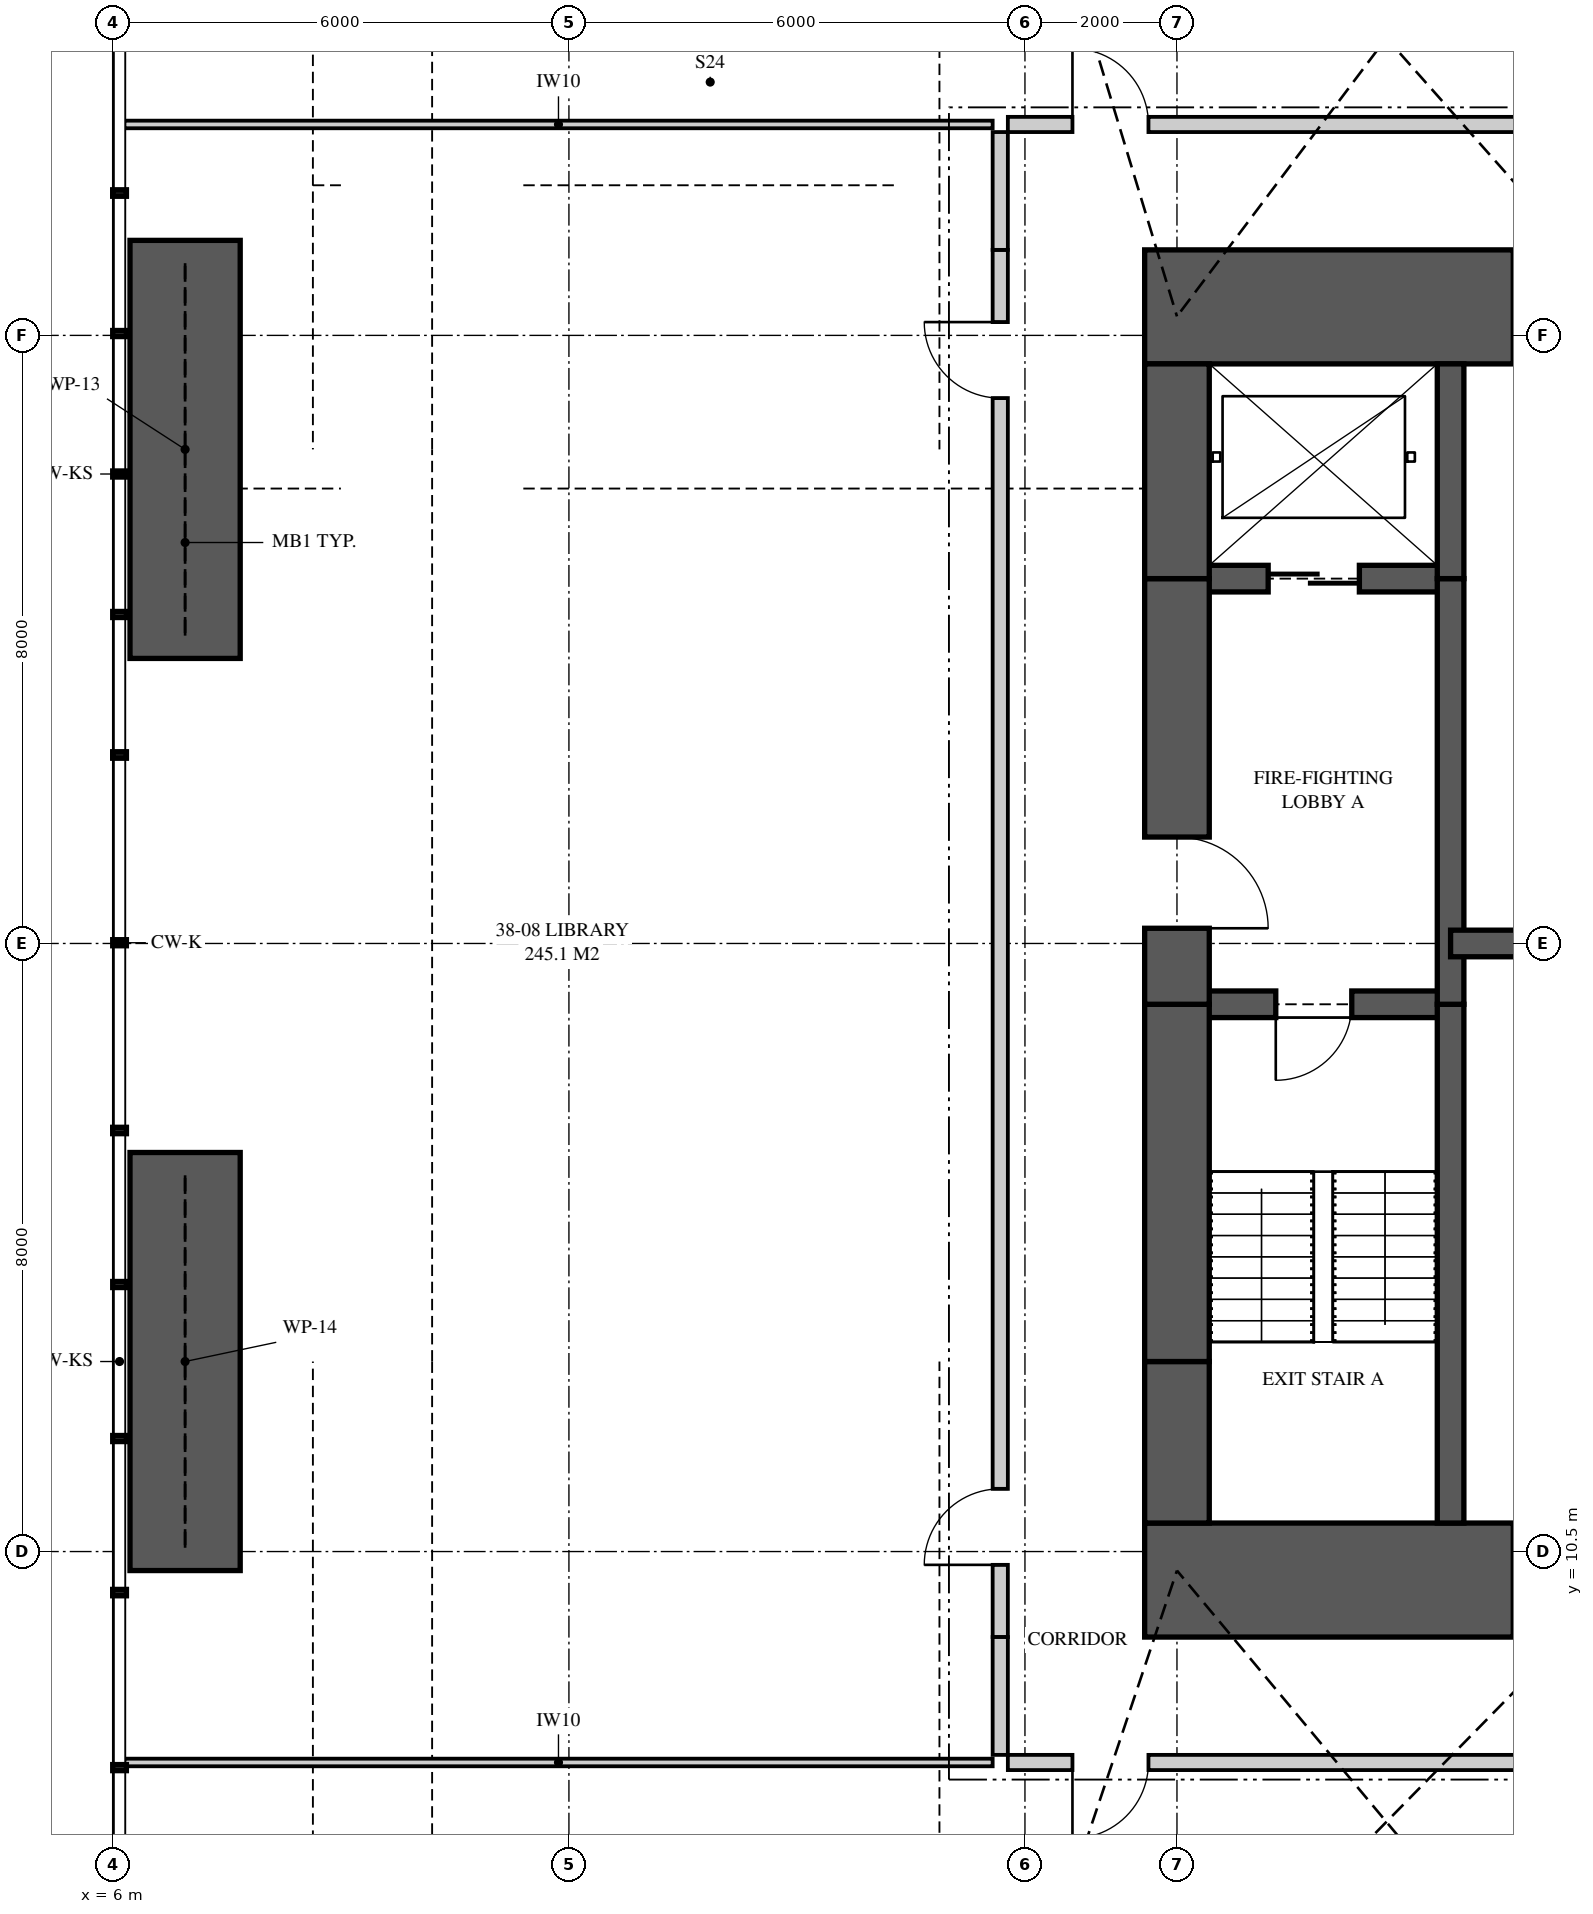
"""IFC4 building model, lengths in metres.
Left out: names, types, materials, properties, quantities, classifications, styles, units other than length and angle.
Written with IfcOpenShell. Run it as: python <this file> out.ifc"""

import sys

from ifc_helpers import new_model, si_unit, direction, frame, frame_2d, origin, place, context, subcontext, project, spatial, polyline, rectangle, outline, extrude, element, fill, save


model = new_model("IFC4")
c1 = context("Model", 3, precision=1e-05, world=origin(), true_north=direction((0.0, 1.0)))
c2 = subcontext(c1, "Body", "Model", "MODEL_VIEW")
j1 = project(units=[si_unit("LENGTHUNIT", "METRE"), si_unit("PLANEANGLEUNIT", "RADIAN")], contexts=[c1])
p1 = place(None, origin())
s1 = spatial("IfcSite", under=j1, at=p1, CompositionType="ELEMENT")
p2 = place(p1, origin())
s2 = spatial("IfcBuilding", under=s1, at=p2, CompositionType="ELEMENT")
p3 = place(p2, frame((0.0, 0.0, 138.35)))
s3 = spatial("IfcBuildingStorey", under=s2, at=p3, CompositionType="ELEMENT", Elevation=138.35)
p4 = place(p3, frame((19.575, 10.125, 0.0), z_axis=(0.0, 0.0, 1.0), x_axis=(1.0, 0.0, 0.0)))
e1 = element("IfcWall", 1, at=p4, inside=s3, PredefinedType="SHEAR", context=c2, shape_type="SweptSolid", body=[
    extrude(rectangle(XDim=6.425, YDim=1.5, at=frame_2d((3.212, 0.0))), origin(), (0.0, 0.0, 1.0), 6.0),
])
p5 = place(p4, frame((4.85, 0.0, 0.0)))
e2 = element("IfcOpeningElement", 2, at=p5, cuts=e1, PredefinedType="OPENING", context=c2, shape_type="SweptSolid", body=[
    extrude(rectangle(XDim=0.75, YDim=2.1, at=frame_2d((0.375, 1.05))), frame((0.0, 0.76, 0.0), z_axis=(0.0, -1.0, 0.0), x_axis=(1.0, 0.0, 0.0)), (0.0, 0.0, 1.0), 1.52),
])
p6 = place(p3, frame((26.0, 26.875, 0.0), z_axis=(0.0, 0.0, 1.0), x_axis=(-1.0, 0.0, 0.0)))
e3 = element("IfcWall", 3, at=p6, inside=s3, PredefinedType="SHEAR", context=c2, shape_type="SweptSolid", body=[
    extrude(rectangle(XDim=6.425, YDim=1.5, at=frame_2d((3.212, 0.0))), origin(), (0.0, 0.0, 1.0), 6.0),
])
p7 = place(p6, frame((0.825, 0.0, 0.0)))
e4 = element("IfcOpeningElement", 4, at=p7, cuts=e3, PredefinedType="OPENING", context=c2, shape_type="SweptSolid", body=[
    extrude(rectangle(XDim=0.75, YDim=2.1, at=frame_2d((0.375, 1.05))), frame((0.0, 0.76, 0.0), z_axis=(0.0, -1.0, 0.0), x_axis=(1.0, 0.0, 0.0)), (0.0, 0.0, 1.0), 1.52),
])
p8 = place(p3, frame((20.0, 26.125, 0.0), z_axis=(0.0, 0.0, 1.0), x_axis=(0.0, -1.0, 0.0)))
e5 = element("IfcWall", 5, at=p8, inside=s3, PredefinedType="SHEAR", context=c2, shape_type="SweptSolid", body=[
    extrude(rectangle(XDim=2.825, YDim=0.85, at=frame_2d((1.413, 0.0))), origin(), (0.0, 0.0, 1.0), 6.0),
])
p9 = place(p3, frame((20.0, 23.3, 0.0), z_axis=(0.0, 0.0, 1.0), x_axis=(0.0, -1.0, 0.0)))
e6 = element("IfcWall", 6, at=p9, inside=s3, PredefinedType="SHEAR", context=c2, shape_type="SweptSolid", body=[
    extrude(rectangle(XDim=5.6, YDim=0.85, at=frame_2d((2.8, 0.0))), origin(), (0.0, 0.0, 1.0), 6.0),
])
p10 = place(p9, frame((3.4, 0.0, 0.0)))
e7 = element("IfcOpeningElement", 7, at=p10, cuts=e6, PredefinedType="OPENING", context=c2, shape_type="SweptSolid", body=[
    extrude(rectangle(XDim=1.2, YDim=2.2, at=frame_2d((0.6, 1.1))), frame((0.0, 0.435, 0.0), z_axis=(0.0, -1.0, 0.0), x_axis=(1.0, 0.0, 0.0)), (0.0, 0.0, 1.0), 0.87),
])
p11 = place(p3, frame((20.0, 17.7, 0.0), z_axis=(0.0, 0.0, 1.0), x_axis=(0.0, -1.0, 0.0)))
e8 = element("IfcWall", 8, at=p11, inside=s3, PredefinedType="SHEAR", context=c2, shape_type="SweptSolid", body=[
    extrude(rectangle(XDim=4.7, YDim=0.85, at=frame_2d((2.35, 0.0))), origin(), (0.0, 0.0, 1.0), 6.0),
])
p12 = place(p3, frame((20.0, 13.0, 0.0), z_axis=(0.0, 0.0, 1.0), x_axis=(0.0, -1.0, 0.0)))
e9 = element("IfcWall", 9, at=p12, inside=s3, PredefinedType="SHEAR", context=c2, shape_type="SweptSolid", body=[
    extrude(rectangle(XDim=2.125, YDim=0.85, at=frame_2d((1.062, 0.0))), origin(), (0.0, 0.0, 1.0), 6.0),
])
p13 = place(p3, frame((23.6, 10.875, 0.0), z_axis=(0.0, 0.0, 1.0), x_axis=(0.0, 1.0, 0.0)))
e10 = element("IfcWall", 10, at=p13, inside=s3, PredefinedType="SHEAR", context=c2, shape_type="SweptSolid", body=[
    extrude(rectangle(XDim=6.825, YDim=0.35, at=frame_2d((3.413, 0.0))), origin(), (0.0, 0.0, 1.0), 6.0),
])
p14 = place(p3, frame((23.6, 17.7, 0.0), z_axis=(0.0, 0.0, 1.0), x_axis=(0.0, 1.0, 0.0)))
e11 = element("IfcWall", 11, at=p14, inside=s3, PredefinedType="SHEAR", context=c2, shape_type="SweptSolid", body=[
    extrude(rectangle(XDim=5.6, YDim=0.35, at=frame_2d((2.8, 0.0))), origin(), (0.0, 0.0, 1.0), 6.0),
])
p15 = place(p3, frame((23.6, 23.3, 0.0), z_axis=(0.0, 0.0, 1.0), x_axis=(0.0, 1.0, 0.0)))
e12 = element("IfcWall", 12, at=p15, inside=s3, PredefinedType="SHEAR", context=c2, shape_type="SweptSolid", body=[
    extrude(rectangle(XDim=2.825, YDim=0.35, at=frame_2d((1.413, 0.0))), origin(), (0.0, 0.0, 1.0), 6.0),
])
p16 = place(p3, frame((20.0, 17.7, 0.0), z_axis=(0.0, 0.0, 1.0), x_axis=(1.0, 0.0, 0.0)))
e13 = element("IfcWall", 13, at=p16, inside=s3, PredefinedType="SHEAR", context=c2, shape_type="SweptSolid", body=[
    extrude(rectangle(XDim=3.6, YDim=0.35, at=frame_2d((1.8, 0.0))), origin(), (0.0, 0.0, 1.0), 6.0),
])
p17 = place(p16, frame((1.3, 0.0, 0.0)))
e14 = element("IfcOpeningElement", 14, at=p17, cuts=e13, PredefinedType="OPENING", context=c2, shape_type="SweptSolid", body=[
    extrude(rectangle(XDim=1.0, YDim=2.1, at=frame_2d((0.5, 1.05))), frame((0.0, 0.185, 0.0), z_axis=(0.0, -1.0, 0.0), x_axis=(1.0, 0.0, 0.0)), (0.0, 0.0, 1.0), 0.37),
])
p18 = place(p3, frame((20.0, 23.3, 0.0), z_axis=(0.0, 0.0, 1.0), x_axis=(1.0, 0.0, 0.0)))
e15 = element("IfcWall", 15, at=p18, inside=s3, PredefinedType="SHEAR", context=c2, shape_type="SweptSolid", body=[
    extrude(rectangle(XDim=3.6, YDim=0.35, at=frame_2d((1.8, 0.0))), origin(), (0.0, 0.0, 1.0), 6.0),
])
p19 = place(p18, frame((1.2, 0.0, 0.0)))
e16 = element("IfcOpeningElement", 16, at=p19, cuts=e15, PredefinedType="OPENING", context=c2, shape_type="SweptSolid", body=[
    extrude(rectangle(XDim=1.2, YDim=2.1, at=frame_2d((0.6, 1.05))), frame((0.0, 0.185, 0.0), z_axis=(0.0, -1.0, 0.0), x_axis=(1.0, 0.0, 0.0)), (0.0, 0.0, 1.0), 0.37),
])
p20 = place(p3, frame((23.6, 18.5, 0.0), z_axis=(0.0, 0.0, 1.0), x_axis=(1.0, 0.0, 0.0)))
e17 = element("IfcWall", 17, at=p20, inside=s3, PredefinedType="SHEAR", context=c2, shape_type="SweptSolid", body=[
    extrude(rectangle(XDim=2.4, YDim=0.35, at=frame_2d((1.2, 0.0))), origin(), (0.0, 0.0, 1.0), 6.0),
])
p21 = place(p3, frame((17.775, 7.725, 0.0), z_axis=(0.0, 0.0, 1.0), x_axis=(1.0, 0.0, 0.0)))
e18 = element("IfcWall", 18, at=p21, inside=s3, PredefinedType="PARTITIONING", context=c2, shape_type="SweptSolid", body=[
    extrude(outline(polyline([(0.0, 0.0), (14.275, 0.0), (14.275, 5.72), (14.002, 5.72), (14.002, 5.141), (13.092, 5.141), (13.092, 5.72), (10.26, 5.72), (10.26, 5.208), (9.69, 5.208), (9.69, 5.72), (6.177, 5.72), (6.177, 5.141), (5.319, 5.141), (5.319, 5.72), (4.72, 5.72), (4.72, 5.141), (3.938, 5.141), (3.938, 5.72), (1.659, 5.72), (1.659, 5.141), (1.094, 5.141), (1.094, 5.72), (0.0, 5.72), (0.0, 0.0)])), frame((0.0, 0.1, 0.0), z_axis=(0.0, -1.0, 0.0), x_axis=(1.0, 0.0, 0.0)), (0.0, 0.0, 1.0), 0.2),
])
p22 = place(p21, frame((0.85, 0.0, 0.0)))
e19 = element("IfcOpeningElement", 19, at=p22, cuts=e18, PredefinedType="OPENING", context=c2, shape_type="SweptSolid", body=[
    extrude(rectangle(XDim=1.0, YDim=2.1, at=frame_2d((0.5, 1.05))), frame((0.0, 0.11, 0.0), z_axis=(0.0, -1.0, 0.0), x_axis=(1.0, 0.0, 0.0)), (0.0, 0.0, 1.0), 0.22),
])
p23 = place(p21, frame((12.375, 0.0, 0.0)))
e20 = element("IfcOpeningElement", 20, at=p23, cuts=e18, PredefinedType="OPENING", context=c2, shape_type="SweptSolid", body=[
    extrude(rectangle(XDim=1.0, YDim=2.1, at=frame_2d((0.5, 1.05))), frame((0.0, 0.11, 0.0), z_axis=(0.0, -1.0, 0.0), x_axis=(1.0, 0.0, 0.0)), (0.0, 0.0, 1.0), 0.22),
])
p24 = place(p3, frame((17.675, 7.825, 0.0), z_axis=(0.0, 0.0, 1.0), x_axis=(0.0, 1.0, 0.0)))
e21 = element("IfcWall", 21, at=p24, inside=s3, PredefinedType="PARTITIONING", context=c2, shape_type="SweptSolid", body=[
    extrude(rectangle(XDim=1.55, YDim=0.2, at=frame_2d((0.775, 0.0))), origin(), (0.0, 0.0, 1.0), 5.72),
])
p25 = place(p3, frame((17.775, 29.275, 0.0), z_axis=(0.0, 0.0, 1.0), x_axis=(1.0, 0.0, 0.0)))
e22 = element("IfcWall", 22, at=p25, inside=s3, PredefinedType="PARTITIONING", context=c2, shape_type="SweptSolid", body=[
    extrude(outline(polyline([(0.0, 0.0), (14.25, 0.0), (14.25, 5.72), (13.709, 5.72), (13.709, 5.141), (12.856, 5.141), (12.856, 5.72), (10.26, 5.72), (10.26, 5.208), (9.69, 5.208), (9.69, 5.72), (6.392, 5.72), (6.392, 5.141), (5.584, 5.141), (5.584, 5.72), (4.496, 5.72), (4.496, 5.141), (3.754, 5.141), (3.754, 5.72), (1.736, 5.72), (1.736, 5.141), (1.182, 5.141), (1.182, 5.72), (0.0, 5.72), (0.0, 0.0)])), frame((0.0, 0.1, 0.0), z_axis=(0.0, -1.0, 0.0), x_axis=(1.0, 0.0, 0.0)), (0.0, 0.0, 1.0), 0.2),
])
p26 = place(p25, frame((0.85, 0.0, 0.0)))
e23 = element("IfcOpeningElement", 23, at=p26, cuts=e22, PredefinedType="OPENING", context=c2, shape_type="SweptSolid", body=[
    extrude(rectangle(XDim=1.0, YDim=2.1, at=frame_2d((0.5, 1.05))), frame((0.0, 0.11, 0.0), z_axis=(0.0, -1.0, 0.0), x_axis=(1.0, 0.0, 0.0)), (0.0, 0.0, 1.0), 0.22),
])
p27 = place(p25, frame((12.375, 0.0, 0.0)))
e24 = element("IfcOpeningElement", 24, at=p27, cuts=e22, PredefinedType="OPENING", context=c2, shape_type="SweptSolid", body=[
    extrude(rectangle(XDim=1.0, YDim=2.1, at=frame_2d((0.5, 1.05))), frame((0.0, 0.11, 0.0), z_axis=(0.0, -1.0, 0.0), x_axis=(1.0, 0.0, 0.0)), (0.0, 0.0, 1.0), 0.22),
])
p28 = place(p3, frame((17.675, 27.625, 0.0), z_axis=(0.0, 0.0, 1.0), x_axis=(0.0, 1.0, 0.0)))
e25 = element("IfcWall", 25, at=p28, inside=s3, PredefinedType="PARTITIONING", context=c2, shape_type="SweptSolid", body=[
    extrude(rectangle(XDim=1.55, YDim=0.2, at=frame_2d((0.775, 0.0))), origin(), (0.0, 0.0, 1.0), 5.72),
])
p29 = place(p3, frame((17.675, 9.375, 0.0), z_axis=(0.0, 0.0, 1.0), x_axis=(0.0, 1.0, 0.0)))
e26 = element("IfcWall", 26, at=p29, inside=s3, PredefinedType="PARTITIONING", context=c2, shape_type="SweptSolid", body=[
    extrude(outline(polyline([(0.0, 0.0), (18.25, 0.0), (18.25, 5.72), (15.975, 5.72), (15.975, 5.02), (15.275, 5.02), (15.275, 5.06), (14.833, 5.06), (14.833, 5.72), (3.975, 5.72), (3.975, 5.02), (3.275, 5.02), (3.275, 5.72), (0.0, 5.72), (0.0, 0.0)])), frame((0.0, 0.1, 0.0), z_axis=(0.0, -1.0, 0.0), x_axis=(1.0, 0.0, 0.0)), (0.0, 0.0, 1.0), 0.2),
])
p30 = place(p29, frame((0.95, 0.0, 0.0)))
e27 = element("IfcOpeningElement", 27, at=p30, cuts=e26, PredefinedType="OPENING", context=c2, shape_type="SweptSolid", body=[
    extrude(rectangle(XDim=1.0, YDim=2.1, at=frame_2d((0.5, 1.05))), frame((0.0, 0.11, 0.0), z_axis=(0.0, -1.0, 0.0), x_axis=(1.0, 0.0, 0.0)), (0.0, 0.0, 1.0), 0.22),
])
p31 = place(p29, frame((16.3, 0.0, 0.0)))
e28 = element("IfcOpeningElement", 28, at=p31, cuts=e26, PredefinedType="OPENING", context=c2, shape_type="SweptSolid", body=[
    extrude(rectangle(XDim=1.0, YDim=2.1, at=frame_2d((0.5, 1.05))), frame((0.0, 0.11, 0.0), z_axis=(0.0, -1.0, 0.0), x_axis=(1.0, 0.0, 0.0)), (0.0, 0.0, 1.0), 0.22),
])
p32 = place(p3, frame((6.15, 7.725, 0.0), z_axis=(0.0, 0.0, 1.0), x_axis=(1.0, 0.0, 0.0)))
e29 = element("IfcWall", 29, at=p32, inside=s3, PredefinedType="PARTITIONING", context=c2, shape_type="SweptSolid", body=[
    extrude(outline(polyline([(0.0, 0.0), (11.425, 0.0), (11.425, 5.72), (11.385, 5.72), (11.385, 5.12), (10.065, 5.12), (10.065, 5.72), (5.31, 5.72), (5.31, 5.12), (2.841, 5.12), (2.841, 4.52), (2.373, 4.52), (2.373, 4.32), (0.938, 4.32), (0.938, 5.72), (0.0, 5.72), (0.0, 0.0)])), frame((0.0, 0.05, 0.0), z_axis=(0.0, -1.0, 0.0), x_axis=(1.0, 0.0, 0.0)), (0.0, 0.0, 1.0), 0.1),
])
p33 = place(p3, frame((6.15, 29.275, 0.0), z_axis=(0.0, 0.0, 1.0), x_axis=(1.0, 0.0, 0.0)))
e30 = element("IfcWall", 30, at=p33, inside=s3, PredefinedType="PARTITIONING", context=c2, shape_type="SweptSolid", body=[
    extrude(outline(polyline([(0.0, 0.0), (11.425, 0.0), (11.425, 5.72), (11.385, 5.72), (11.385, 5.12), (10.065, 5.12), (10.065, 5.72), (5.31, 5.72), (5.31, 5.12), (2.841, 5.12), (2.841, 4.52), (2.21, 4.52), (2.21, 4.32), (0.776, 4.32), (0.776, 5.72), (0.0, 5.72), (0.0, 0.0)])), frame((0.0, 0.05, 0.0), z_axis=(0.0, -1.0, 0.0), x_axis=(1.0, 0.0, 0.0)), (0.0, 0.0, 1.0), 0.1),
])
for number, where, z_axis, x_axis in (
    (31, (6.95, 22.25, 0.0), (0.0, 0.0, 1.0), (0.0, 1.0, 0.0)),
    (32, (6.95, 10.25, 0.0), (0.0, 0.0, 1.0), (0.0, 1.0, 0.0)),
):
    element("IfcWall", number, at=place(p3, frame(where, z_axis=z_axis, x_axis=x_axis)), inside=s3, PredefinedType="SHEAR", context=c2, shape_type="SweptSolid", body=[
        extrude(rectangle(XDim=5.5, YDim=1.45, at=frame_2d((2.75, 0.0))), origin(), (0.0, 0.0, 1.0), 6.0),
    ])
p34 = place(p22, frame((1.0, 0.0, 0.0), z_axis=(0.0, 0.0, 1.0), x_axis=(-1.0, 0.0, 0.0)))
e33 = element("IfcDoor", 33, at=p34, inside=s3, OperationType="SINGLE_SWING_RIGHT", PredefinedType="DOOR", context=c2, shape_type="SweptSolid", body=[
    extrude(rectangle(XDim=1.0, YDim=2.1, at=frame_2d((0.5, 1.05))), frame((0.0, 0.025, 0.0), z_axis=(0.0, -1.0, 0.0), x_axis=(1.0, 0.0, 0.0)), (0.0, 0.0, 1.0), 0.05),
])
fill(e19, e33)
p35 = place(p26, origin())
e34 = element("IfcDoor", 34, at=p35, inside=s3, OperationType="SINGLE_SWING_LEFT", PredefinedType="DOOR", context=c2, shape_type="SweptSolid", body=[
    extrude(rectangle(XDim=1.0, YDim=2.1, at=frame_2d((0.5, 1.05))), frame((0.0, 0.025, 0.0), z_axis=(0.0, -1.0, 0.0), x_axis=(1.0, 0.0, 0.0)), (0.0, 0.0, 1.0), 0.05),
])
fill(e23, e34)
p36 = place(p30, origin())
e35 = element("IfcDoor", 35, at=p36, inside=s3, OperationType="SINGLE_SWING_LEFT", PredefinedType="DOOR", context=c2, shape_type="SweptSolid", body=[
    extrude(rectangle(XDim=1.0, YDim=2.1, at=frame_2d((0.5, 1.05))), frame((0.0, 0.025, 0.0), z_axis=(0.0, -1.0, 0.0), x_axis=(1.0, 0.0, 0.0)), (0.0, 0.0, 1.0), 0.05),
])
fill(e27, e35)
p37 = place(p31, origin())
e36 = element("IfcDoor", 36, at=p37, inside=s3, OperationType="SINGLE_SWING_RIGHT", PredefinedType="DOOR", context=c2, shape_type="SweptSolid", body=[
    extrude(rectangle(XDim=1.0, YDim=2.1, at=frame_2d((0.5, 1.05))), frame((0.0, 0.025, 0.0), z_axis=(0.0, -1.0, 0.0), x_axis=(1.0, 0.0, 0.0)), (0.0, 0.0, 1.0), 0.05),
])
fill(e28, e36)
p38 = place(p17, frame((1.0, 0.0, 0.0), z_axis=(0.0, 0.0, 1.0), x_axis=(-1.0, 0.0, 0.0)))
e37 = element("IfcDoor", 37, at=p38, inside=s3, OperationType="SINGLE_SWING_RIGHT", PredefinedType="DOOR", context=c2, shape_type="SweptSolid", body=[
    extrude(rectangle(XDim=1.0, YDim=2.1, at=frame_2d((0.5, 1.05))), frame((0.0, 0.025, 0.0), z_axis=(0.0, -1.0, 0.0), x_axis=(1.0, 0.0, 0.0)), (0.0, 0.0, 1.0), 0.05),
])
fill(e14, e37)
p39 = place(p10, origin())
e38 = element("IfcDoor", 38, at=p39, inside=s3, OperationType="SINGLE_SWING_RIGHT", PredefinedType="DOOR", context=c2, shape_type="SweptSolid", body=[
    extrude(rectangle(XDim=1.2, YDim=2.2, at=frame_2d((0.6, 1.1))), frame((0.0, 0.025, 0.0), z_axis=(0.0, -1.0, 0.0), x_axis=(1.0, 0.0, 0.0)), (0.0, 0.0, 1.0), 0.05),
])
fill(e7, e38)
p40 = place(p19, origin())
e39 = element("IfcDoor", 39, at=p40, inside=s3, OperationType="SLIDING_TO_LEFT", PredefinedType="DOOR", context=c2, shape_type="SweptSolid", body=[
    extrude(rectangle(XDim=1.2, YDim=2.1, at=frame_2d((0.6, 1.05))), frame((0.0, 0.025, 0.0), z_axis=(0.0, -1.0, 0.0), x_axis=(1.0, 0.0, 0.0)), (0.0, 0.0, 1.0), 0.05),
])
fill(e16, e39)
save(model, sys.argv[1])
